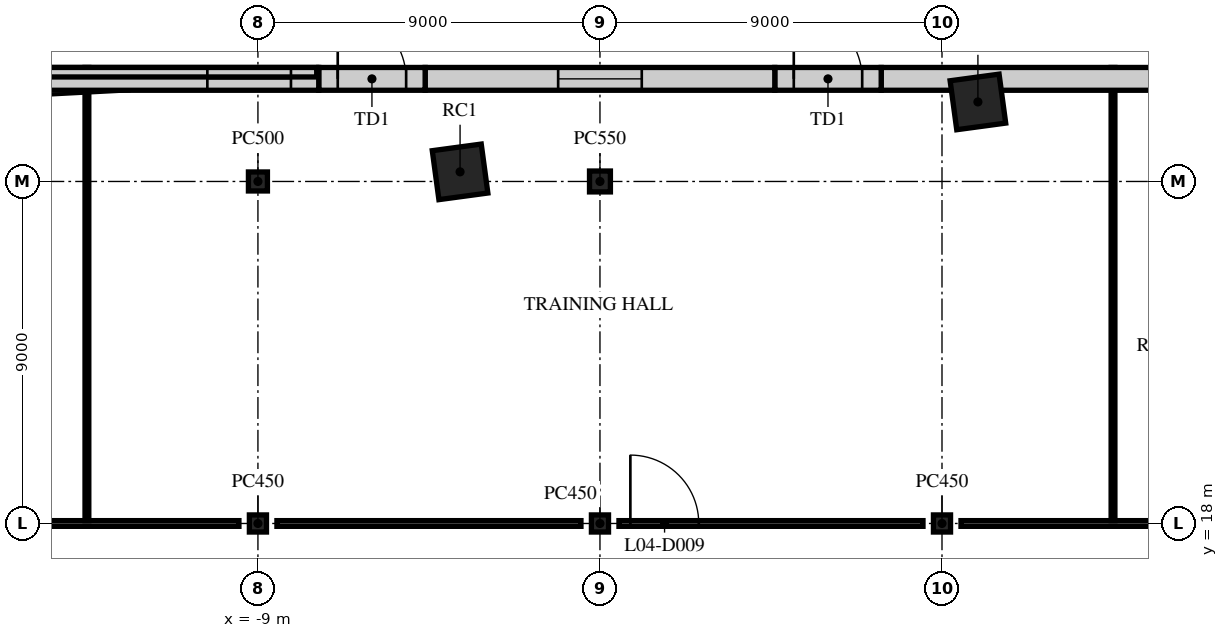
"""IFC4 building model, lengths in metres.
Left out: names, types, materials, properties, quantities, classifications, styles, units other than length and angle.
Written with IfcOpenShell. Run it as: python <this file> out.ifc"""

import sys

from ifc_helpers import new_model, si_unit, direction, frame, frame_2d, origin, origin_2d, place, context, subcontext, project, spatial, rectangle, extrude, element, fill, save


model = new_model("IFC4")
c1 = context("Model", 3, precision=1e-05, world=origin(), true_north=direction((0.0, 1.0)))
c2 = subcontext(c1, "Body", "Model", "MODEL_VIEW")
j1 = project(units=[si_unit("LENGTHUNIT", "METRE"), si_unit("PLANEANGLEUNIT", "RADIAN")], contexts=[c1])
p1 = place(None, origin())
s1 = spatial("IfcSite", under=j1, at=p1, CompositionType="ELEMENT")
p2 = place(p1, origin())
s2 = spatial("IfcBuilding", under=s1, at=p2, CompositionType="ELEMENT")
p3 = place(p2, frame((0.0, 0.0, 18.0)))
s3 = spatial("IfcBuildingStorey", under=s2, at=p3, CompositionType="ELEMENT", Elevation=18.0)
p4 = place(p3, frame((-9.0, 18.0, 0.0), z_axis=(0.0, 0.0, 1.0), x_axis=(1.0, 0.0, 0.0)))
e1 = element("IfcColumn", 1, at=p4, inside=s3, PredefinedType="COLUMN", context=c2, shape_type="SweptSolid", body=[
    extrude(rectangle(XDim=0.45, YDim=0.45, at=origin_2d()), origin(), (0.0, 0.0, 1.0), 4.5),
])
p5 = place(p3, frame((-9.0, 27.0, 0.0), z_axis=(0.0, 0.0, 1.0), x_axis=(1.0, 0.0, 0.0)))
e2 = element("IfcColumn", 2, at=p5, inside=s3, PredefinedType="COLUMN", context=c2, shape_type="SweptSolid", body=[
    extrude(rectangle(XDim=0.5, YDim=0.5, at=origin_2d()), origin(), (0.0, 0.0, 1.0), 4.5),
])
p6 = place(p3, frame((0.0, 18.0, 0.0), z_axis=(0.0, 0.0, 1.0), x_axis=(1.0, 0.0, 0.0)))
e3 = element("IfcColumn", 3, at=p6, inside=s3, PredefinedType="COLUMN", context=c2, shape_type="SweptSolid", body=[
    extrude(rectangle(XDim=0.45, YDim=0.45, at=origin_2d()), origin(), (0.0, 0.0, 1.0), 4.5),
])
p7 = place(p3, frame((0.0, 27.0, 0.0), z_axis=(0.0, 0.0, 1.0), x_axis=(1.0, 0.0, 0.0)))
e4 = element("IfcColumn", 4, at=p7, inside=s3, PredefinedType="COLUMN", context=c2, shape_type="SweptSolid", body=[
    extrude(rectangle(XDim=0.55, YDim=0.55, at=origin_2d()), origin(), (0.0, 0.0, 1.0), 4.5),
])
p8 = place(p3, frame((9.0, 18.0, 0.0), z_axis=(0.0, 0.0, 1.0), x_axis=(1.0, 0.0, 0.0)))
e5 = element("IfcColumn", 5, at=p8, inside=s3, PredefinedType="COLUMN", context=c2, shape_type="SweptSolid", body=[
    extrude(rectangle(XDim=0.45, YDim=0.45, at=origin_2d()), origin(), (0.0, 0.0, 1.0), 4.5),
])
for number, where, z_axis, x_axis in (
    (6, (9.945, 29.093, 0.0), (0.0, 0.0, 1.0), (0.991, 0.134, 0.0)),
    (7, (-3.681, 27.253, 0.0), (0.0, 0.0, 1.0), (0.991, 0.134, 0.0)),
):
    element("IfcColumn", number, at=place(p3, frame(where, z_axis=z_axis, x_axis=x_axis)), inside=s3, PredefinedType="COLUMN", context=c2, shape_type="SweptSolid", body=[
        extrude(rectangle(XDim=1.3, YDim=1.3, at=origin_2d()), origin(), (0.0, 0.0, 1.0), 4.5),
    ])
for number, where, z_axis, x_axis in (
    (8, (-17.5, 18.0, 0.0), (0.0, 0.0, 1.0), (1.0, 0.0, 0.0)),
    (9, (-8.5, 18.0, 0.0), (0.0, 0.0, 1.0), (1.0, 0.0, 0.0)),
):
    element("IfcWall", number, at=place(p3, frame(where, z_axis=z_axis, x_axis=x_axis)), inside=s3, PredefinedType="PARTITIONING", context=c2, shape_type="SweptSolid", body=[
        extrude(rectangle(XDim=8.0, YDim=0.15, at=frame_2d((4.0, 0.0))), origin(), (0.0, 0.0, 1.0), 3.53),
    ])
p9 = place(p3, frame((0.5, 18.0, 0.0), z_axis=(0.0, 0.0, 1.0), x_axis=(1.0, 0.0, 0.0)))
e10 = element("IfcWall", 10, at=p9, inside=s3, PredefinedType="PARTITIONING", context=c2, shape_type="SweptSolid", body=[
    extrude(rectangle(XDim=8.0, YDim=0.15, at=frame_2d((4.0, 0.0))), origin(), (0.0, 0.0, 1.0), 3.53),
])
p10 = place(p9, frame((0.3, 0.0, 0.0)))
e11 = element("IfcOpeningElement", 11, at=p10, cuts=e10, PredefinedType="OPENING", context=c2, shape_type="SweptSolid", body=[
    extrude(rectangle(XDim=1.8, YDim=2.1, at=frame_2d((0.9, 1.05))), frame((0.0, 0.085, 0.0), z_axis=(0.0, -1.0, 0.0), x_axis=(1.0, 0.0, 0.0)), (0.0, 0.0, 1.0), 0.17),
])
p11 = place(p3, frame((9.5, 18.0, 0.0), z_axis=(0.0, 0.0, 1.0), x_axis=(1.0, 0.0, 0.0)))
e12 = element("IfcWall", 12, at=p11, inside=s3, PredefinedType="PARTITIONING", context=c2, shape_type="SweptSolid", body=[
    extrude(rectangle(XDim=8.0, YDim=0.15, at=frame_2d((4.0, 0.0))), origin(), (0.0, 0.0, 1.0), 3.53),
])
for number, where, z_axis, x_axis in (
    (13, (-13.5, 18.075, 0.0), (0.0, 0.0, 1.0), (0.0, 1.0, 0.0)),
    (14, (13.5, 18.075, 0.0), (0.0, 0.0, 1.0), (0.0, 1.0, 0.0)),
):
    element("IfcWall", number, at=place(p3, frame(where, z_axis=z_axis, x_axis=x_axis)), inside=s3, PredefinedType="PARTITIONING", context=c2, shape_type="SweptSolid", body=[
        extrude(rectangle(XDim=11.925, YDim=0.1, at=frame_2d((5.962, 0.0))), origin(), (0.0, 0.0, 1.0), 3.23),
    ])
p12 = place(p3, frame((29.4, 29.7, 0.0), z_axis=(0.0, 0.0, 1.0), x_axis=(-1.0, 0.0, 0.0)))
e15 = element("IfcWall", 15, at=p12, inside=s3, PredefinedType="STANDARD", context=c2, shape_type="SweptSolid", body=[
    extrude(rectangle(XDim=22.0, YDim=0.6, at=frame_2d((11.0, 0.0))), origin(), (0.0, 0.0, 1.0), 4.05),
])
p13 = place(p12, frame((9.838, 0.0, 0.9)))
e16 = element("IfcOpeningElement", 16, at=p13, cuts=e15, PredefinedType="OPENING", context=c2, shape_type="SweptSolid", body=[
    extrude(rectangle(XDim=2.2, YDim=3.0, at=frame_2d((1.1, 1.5))), frame((0.0, 0.31, 0.0), z_axis=(0.0, -1.0, 0.0), x_axis=(1.0, 0.0, 0.0)), (0.0, 0.0, 1.0), 0.62),
])
p14 = place(p3, frame((4.6, 29.7, 0.0), z_axis=(0.0, 0.0, 1.0), x_axis=(1.0, 0.0, 0.0)))
e17 = element("IfcWall", 17, at=p14, inside=s3, PredefinedType="STANDARD", context=c2, shape_type="SweptSolid", body=[
    extrude(rectangle(XDim=2.8, YDim=0.6, at=frame_2d((1.4, 0.0))), origin(), (0.0, 0.0, 1.0), 4.05),
])
p15 = place(p14, frame((0.5, 0.0, 0.0)))
e18 = element("IfcOpeningElement", 18, at=p15, cuts=e17, PredefinedType="OPENING", context=c2, shape_type="SweptSolid", body=[
    extrude(rectangle(XDim=1.8, YDim=2.4, at=frame_2d((0.9, 1.2))), frame((0.0, 0.31, 0.0), z_axis=(0.0, -1.0, 0.0), x_axis=(1.0, 0.0, 0.0)), (0.0, 0.0, 1.0), 0.62),
])
p16 = place(p3, frame((4.6, 29.7, 0.0), z_axis=(0.0, 0.0, 1.0), x_axis=(-1.0, 0.0, 0.0)))
e19 = element("IfcWall", 19, at=p16, inside=s3, PredefinedType="STANDARD", context=c2, shape_type="SweptSolid", body=[
    extrude(rectangle(XDim=9.2, YDim=0.6, at=frame_2d((4.6, 0.0))), origin(), (0.0, 0.0, 1.0), 4.05),
])
p17 = place(p16, frame((3.5, 0.0, 0.9)))
e20 = element("IfcOpeningElement", 20, at=p17, cuts=e19, PredefinedType="OPENING", context=c2, shape_type="SweptSolid", body=[
    extrude(rectangle(XDim=2.2, YDim=3.0, at=frame_2d((1.1, 1.5))), frame((0.0, 0.31, 0.0), z_axis=(0.0, -1.0, 0.0), x_axis=(1.0, 0.0, 0.0)), (0.0, 0.0, 1.0), 0.62),
])
p18 = place(p3, frame((-7.4, 29.7, 0.0), z_axis=(0.0, 0.0, 1.0), x_axis=(1.0, 0.0, 0.0)))
e21 = element("IfcWall", 21, at=p18, inside=s3, PredefinedType="STANDARD", context=c2, shape_type="SweptSolid", body=[
    extrude(rectangle(XDim=2.8, YDim=0.6, at=frame_2d((1.4, 0.0))), origin(), (0.0, 0.0, 1.0), 4.05),
])
p19 = place(p18, frame((0.5, 0.0, 0.0)))
e22 = element("IfcOpeningElement", 22, at=p19, cuts=e21, PredefinedType="OPENING", context=c2, shape_type="SweptSolid", body=[
    extrude(rectangle(XDim=1.8, YDim=2.4, at=frame_2d((0.9, 1.2))), frame((0.0, 0.31, 0.0), z_axis=(0.0, -1.0, 0.0), x_axis=(1.0, 0.0, 0.0)), (0.0, 0.0, 1.0), 0.62),
])
p20 = place(p3, frame((-7.4, 29.7, 0.0), z_axis=(0.0, 0.0, 1.0), x_axis=(-1.0, 0.0, 0.0)))
e23 = element("IfcWall", 23, at=p20, inside=s3, PredefinedType="STANDARD", context=c2, shape_type="SweptSolid", body=[
    extrude(rectangle(XDim=22.6, YDim=0.6, at=frame_2d((11.3, 0.0))), origin(), (0.0, 0.0, 1.0), 4.05),
])
p21 = place(p20, frame((0.731, 0.0, 0.9)))
e24 = element("IfcOpeningElement", 24, at=p21, cuts=e23, PredefinedType="OPENING", context=c2, shape_type="SweptSolid", body=[
    extrude(rectangle(XDim=2.2, YDim=3.0, at=frame_2d((1.1, 1.5))), frame((0.0, 0.31, 0.0), z_axis=(0.0, -1.0, 0.0), x_axis=(1.0, 0.0, 0.0)), (0.0, 0.0, 1.0), 0.62),
])
p22 = place(p20, frame((9.961, 0.0, 0.9)))
e25 = element("IfcOpeningElement", 25, at=p22, cuts=e23, PredefinedType="OPENING", context=c2, shape_type="SweptSolid", body=[
    extrude(rectangle(XDim=2.2, YDim=3.0, at=frame_2d((1.1, 1.5))), frame((0.0, 0.31, 0.0), z_axis=(0.0, -1.0, 0.0), x_axis=(1.0, 0.0, 0.0)), (0.0, 0.0, 1.0), 0.62),
])
p23 = place(p3, frame((-7.453, 29.875, 4.5), z_axis=(0.0, 0.0, 1.0), x_axis=(-1.0, 0.0, 0.0)))
e26 = element("IfcWall", 26, at=p23, inside=s3, PredefinedType="PARAPET", context=c2, shape_type="SweptSolid", body=[
    extrude(rectangle(XDim=22.547, YDim=0.25, at=frame_2d((11.273, 0.0))), origin(), (0.0, 0.0, 1.0), 1.1),
])
p24 = place(p10, origin())
e27 = element("IfcDoor", 27, at=p24, inside=s3, OperationType="DOUBLE_DOOR_SINGLE_SWING", PredefinedType="DOOR", context=c2, shape_type="SweptSolid", body=[
    extrude(rectangle(XDim=1.8, YDim=2.1, at=frame_2d((0.9, 1.05))), frame((0.0, 0.025, 0.0), z_axis=(0.0, -1.0, 0.0), x_axis=(1.0, 0.0, 0.0)), (0.0, 0.0, 1.0), 0.05),
])
fill(e11, e27)
p25 = place(p15, origin())
e28 = element("IfcDoor", 28, at=p25, inside=s3, OperationType="DOUBLE_DOOR_SINGLE_SWING", PredefinedType="DOOR", context=c2, shape_type="SweptSolid", body=[
    extrude(rectangle(XDim=1.8, YDim=2.4, at=frame_2d((0.9, 1.2))), frame((0.0, 0.025, 0.0), z_axis=(0.0, -1.0, 0.0), x_axis=(1.0, 0.0, 0.0)), (0.0, 0.0, 1.0), 0.05),
])
fill(e18, e28)
p26 = place(p17, origin())
e29 = element("IfcWindow", 29, at=p26, inside=s3, PartitioningType="SINGLE_PANEL", PredefinedType="WINDOW", context=c2, shape_type="SweptSolid", body=[
    extrude(rectangle(XDim=2.2, YDim=3.0, at=frame_2d((1.1, 1.5))), frame((0.0, 0.03, 0.0), z_axis=(0.0, -1.0, 0.0), x_axis=(1.0, 0.0, 0.0)), (0.0, 0.0, 1.0), 0.06),
])
fill(e20, e29)
p27 = place(p19, origin())
e30 = element("IfcDoor", 30, at=p27, inside=s3, OperationType="DOUBLE_DOOR_SINGLE_SWING", PredefinedType="DOOR", context=c2, shape_type="SweptSolid", body=[
    extrude(rectangle(XDim=1.8, YDim=2.4, at=frame_2d((0.9, 1.2))), frame((0.0, 0.025, 0.0), z_axis=(0.0, -1.0, 0.0), x_axis=(1.0, 0.0, 0.0)), (0.0, 0.0, 1.0), 0.05),
])
fill(e22, e30)
p28 = place(p21, origin())
e31 = element("IfcWindow", 31, at=p28, inside=s3, PartitioningType="SINGLE_PANEL", PredefinedType="WINDOW", context=c2, shape_type="SweptSolid", body=[
    extrude(rectangle(XDim=2.2, YDim=3.0, at=frame_2d((1.1, 1.5))), frame((0.0, 0.03, 0.0), z_axis=(0.0, -1.0, 0.0), x_axis=(1.0, 0.0, 0.0)), (0.0, 0.0, 1.0), 0.06),
])
fill(e24, e31)
save(model, sys.argv[1])
